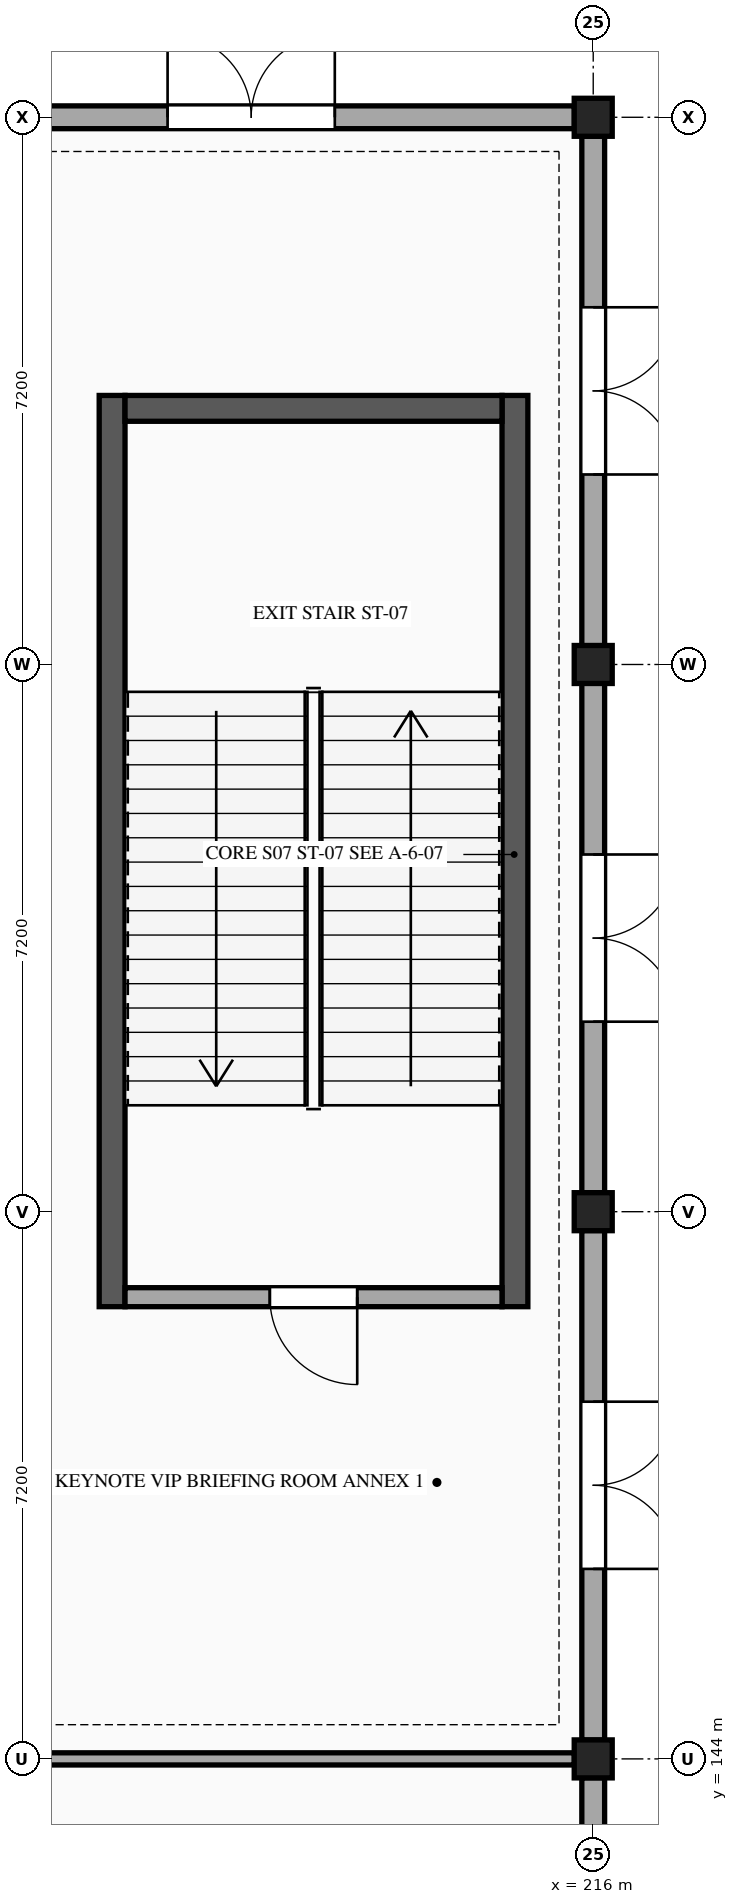
"""IFC4 building model, lengths in metres.
Left out: names, types, materials, properties, quantities, classifications, styles, units other than length and angle.
Written with IfcOpenShell. Run it as: python <this file> out.ifc"""

import sys

from ifc_helpers import new_model, si_unit, direction, frame, frame_2d, origin, origin_2d, place, context, subcontext, project, spatial, rectangle, hollow_rectangle, extrude, element, fill, save


model = new_model("IFC4")
c1 = context("Model", 3, precision=1e-05, world=origin(), true_north=direction((0.0, 1.0)))
c2 = subcontext(c1, "Body", "Model", "MODEL_VIEW")
j1 = project(units=[si_unit("LENGTHUNIT", "METRE"), si_unit("PLANEANGLEUNIT", "RADIAN")], contexts=[c1])
p1 = place(None, origin())
s1 = spatial("IfcSite", under=j1, at=p1, CompositionType="ELEMENT")
p2 = place(p1, origin())
s2 = spatial("IfcBuilding", under=s1, at=p2, CompositionType="ELEMENT")
p3 = place(p2, origin())
s3 = spatial("IfcBuildingStorey", under=s2, at=p3, CompositionType="ELEMENT", Elevation=0.0)
for number, where, z_axis, x_axis in (
    (1, (216.0, 144.0, 0.0), (0.0, 0.0, 1.0), (1.0, 0.0, 0.0)),
    (2, (216.0, 151.2, 0.0), (0.0, 0.0, 1.0), (1.0, 0.0, 0.0)),
    (3, (216.0, 158.4, 0.0), (0.0, 0.0, 1.0), (1.0, 0.0, 0.0)),
    (4, (216.0, 165.6, 0.0), (0.0, 0.0, 1.0), (1.0, 0.0, 0.0)),
):
    element("IfcColumn", number, at=place(p3, frame(where, z_axis=z_axis, x_axis=x_axis)), inside=s3, PredefinedType="COLUMN", context=c2, shape_type="SweptSolid", body=[
        extrude(hollow_rectangle(XDim=0.5, YDim=0.5, WallThickness=0.02, at=origin_2d()), origin(), (0.0, 0.0, 1.0), 5.4),
    ])
for number, where, z_axis, x_axis in (
    (5, (209.67, 149.95, 0.0), (0.0, 0.0, 1.0), (0.0, 1.0, 0.0)),
    (6, (214.97, 161.94, 0.0), (0.0, 0.0, 1.0), (0.0, -1.0, 0.0)),
):
    element("IfcWall", number, at=place(p3, frame(where, z_axis=z_axis, x_axis=x_axis)), inside=s3, PredefinedType="SHEAR", context=c2, shape_type="SweptSolid", body=[
        extrude(rectangle(XDim=11.99, YDim=0.34, at=frame_2d((5.995, 0.0))), origin(), (0.0, 0.0, 1.0), 4.98),
    ])
p4 = place(p3, frame((209.84, 161.77, 0.0), z_axis=(0.0, 0.0, 1.0), x_axis=(1.0, 0.0, 0.0)))
e7 = element("IfcWall", 7, at=p4, inside=s3, PredefinedType="SHEAR", context=c2, shape_type="SweptSolid", body=[
    extrude(rectangle(XDim=4.96, YDim=0.34, at=frame_2d((2.48, 0.0))), origin(), (0.0, 0.0, 1.0), 4.98),
])
p5 = place(p3, frame((207.248, 165.6, 0.0), z_axis=(0.0, 0.0, 1.0), x_axis=(1.0, 0.0, 0.0)))
e8 = element("IfcWall", 8, at=p5, inside=s3, PredefinedType="STANDARD", context=c2, shape_type="SweptSolid", body=[
    extrude(rectangle(XDim=8.504, YDim=0.3, at=frame_2d((4.252, 0.0))), origin(), (0.0, 0.0, 1.0), 4.297),
])
p6 = place(p5, frame((3.152, 0.0, 0.0)))
e9 = element("IfcOpeningElement", 9, at=p6, cuts=e8, PredefinedType="OPENING", context=c2, shape_type="SweptSolid", body=[
    extrude(rectangle(XDim=2.2, YDim=2.4, at=frame_2d((1.1, 1.2))), frame((0.0, 0.16, 0.0), z_axis=(0.0, -1.0, 0.0), x_axis=(1.0, 0.0, 0.0)), (0.0, 0.0, 1.0), 0.32),
])
p7 = place(p3, frame((216.0, 165.352, 0.0), z_axis=(0.0, 0.0, 1.0), x_axis=(0.0, -1.0, 0.0)))
e10 = element("IfcWall", 10, at=p7, inside=s3, PredefinedType="STANDARD", context=c2, shape_type="SweptSolid", body=[
    extrude(rectangle(XDim=6.704, YDim=0.3, at=frame_2d((3.352, 0.0))), origin(), (0.0, 0.0, 1.0), 4.607),
])
p8 = place(p7, frame((2.252, 0.0, 0.0)))
e11 = element("IfcOpeningElement", 11, at=p8, cuts=e10, PredefinedType="OPENING", context=c2, shape_type="SweptSolid", body=[
    extrude(rectangle(XDim=2.2, YDim=2.4, at=frame_2d((1.1, 1.2))), frame((0.0, 0.16, 0.0), z_axis=(0.0, -1.0, 0.0), x_axis=(1.0, 0.0, 0.0)), (0.0, 0.0, 1.0), 0.32),
])
p9 = place(p3, frame((216.0, 158.152, 0.0), z_axis=(0.0, 0.0, 1.0), x_axis=(0.0, -1.0, 0.0)))
e12 = element("IfcWall", 12, at=p9, inside=s3, PredefinedType="STANDARD", context=c2, shape_type="SweptSolid", body=[
    extrude(rectangle(XDim=6.704, YDim=0.3, at=frame_2d((3.352, 0.0))), origin(), (0.0, 0.0, 1.0), 4.68),
])
p10 = place(p9, frame((2.252, 0.0, 0.0)))
e13 = element("IfcOpeningElement", 13, at=p10, cuts=e12, PredefinedType="OPENING", context=c2, shape_type="SweptSolid", body=[
    extrude(rectangle(XDim=2.2, YDim=2.4, at=frame_2d((1.1, 1.2))), frame((0.0, 0.16, 0.0), z_axis=(0.0, -1.0, 0.0), x_axis=(1.0, 0.0, 0.0)), (0.0, 0.0, 1.0), 0.32),
])
p11 = place(p3, frame((216.0, 150.952, 0.0), z_axis=(0.0, 0.0, 1.0), x_axis=(0.0, -1.0, 0.0)))
e14 = element("IfcWall", 14, at=p11, inside=s3, PredefinedType="STANDARD", context=c2, shape_type="SweptSolid", body=[
    extrude(rectangle(XDim=6.704, YDim=0.3, at=frame_2d((3.352, 0.0))), origin(), (0.0, 0.0, 1.0), 4.124),
])
p12 = place(p11, frame((2.252, 0.0, 0.0)))
e15 = element("IfcOpeningElement", 15, at=p12, cuts=e14, PredefinedType="OPENING", context=c2, shape_type="SweptSolid", body=[
    extrude(rectangle(XDim=2.2, YDim=2.4, at=frame_2d((1.1, 1.2))), frame((0.0, 0.16, 0.0), z_axis=(0.0, -1.0, 0.0), x_axis=(1.0, 0.0, 0.0)), (0.0, 0.0, 1.0), 0.32),
])
p13 = place(p3, frame((216.0, 143.752, 0.0), z_axis=(0.0, 0.0, 1.0), x_axis=(0.0, -1.0, 0.0)))
e16 = element("IfcWall", 16, at=p13, inside=s3, PredefinedType="STANDARD", context=c2, shape_type="SweptSolid", body=[
    extrude(rectangle(XDim=6.704, YDim=0.3, at=frame_2d((3.352, 0.0))), origin(), (0.0, 0.0, 1.0), 4.124),
])
p14 = place(p13, frame((2.252, 0.0, 0.0)))
e17 = element("IfcOpeningElement", 17, at=p14, cuts=e16, PredefinedType="OPENING", context=c2, shape_type="SweptSolid", body=[
    extrude(rectangle(XDim=2.2, YDim=2.4, at=frame_2d((1.1, 1.2))), frame((0.0, 0.16, 0.0), z_axis=(0.0, -1.0, 0.0), x_axis=(1.0, 0.0, 0.0)), (0.0, 0.0, 1.0), 0.32),
])
p15 = place(p3, frame((214.8, 150.075, 0.0), z_axis=(0.0, 0.0, 1.0), x_axis=(-1.0, 0.0, 0.0)))
e18 = element("IfcWall", 18, at=p15, inside=s3, PredefinedType="STANDARD", context=c2, shape_type="SweptSolid", body=[
    extrude(rectangle(XDim=4.96, YDim=0.25, at=frame_2d((2.48, 0.0))), origin(), (0.0, 0.0, 1.0), 4.98),
])
p16 = place(p15, frame((1.905, 0.0, 0.0)))
e19 = element("IfcOpeningElement", 19, at=p16, cuts=e18, PredefinedType="OPENING", context=c2, shape_type="SweptSolid", body=[
    extrude(rectangle(XDim=1.15, YDim=2.2, at=frame_2d((0.575, 1.1))), frame((0.0, 0.135, 0.0), z_axis=(0.0, -1.0, 0.0), x_axis=(1.0, 0.0, 0.0)), (0.0, 0.0, 1.0), 0.27),
])
p17 = place(p3, frame((207.373, 144.0, 0.0), z_axis=(0.0, 0.0, 1.0), x_axis=(1.0, 0.0, 0.0)))
e20 = element("IfcWall", 20, at=p17, inside=s3, PredefinedType="PARTITIONING", context=c2, shape_type="SweptSolid", body=[
    extrude(rectangle(XDim=8.379, YDim=0.16, at=frame_2d((4.189, 0.0))), origin(), (0.0, 0.0, 1.0), 4.124),
])
p18 = place(p6, origin())
e21 = element("IfcDoor", 21, at=p18, inside=s3, OperationType="DOUBLE_DOOR_SINGLE_SWING", PredefinedType="DOOR", context=c2, shape_type="SweptSolid", body=[
    extrude(rectangle(XDim=2.2, YDim=2.4, at=frame_2d((1.1, 1.2))), frame((0.0, 0.025, 0.0), z_axis=(0.0, -1.0, 0.0), x_axis=(1.0, 0.0, 0.0)), (0.0, 0.0, 1.0), 0.05),
])
fill(e9, e21)
p19 = place(p8, origin())
e22 = element("IfcDoor", 22, at=p19, inside=s3, OperationType="DOUBLE_DOOR_SINGLE_SWING", PredefinedType="DOOR", context=c2, shape_type="SweptSolid", body=[
    extrude(rectangle(XDim=2.2, YDim=2.4, at=frame_2d((1.1, 1.2))), frame((0.0, 0.025, 0.0), z_axis=(0.0, -1.0, 0.0), x_axis=(1.0, 0.0, 0.0)), (0.0, 0.0, 1.0), 0.05),
])
fill(e11, e22)
p20 = place(p10, origin())
e23 = element("IfcDoor", 23, at=p20, inside=s3, OperationType="DOUBLE_DOOR_SINGLE_SWING", PredefinedType="DOOR", context=c2, shape_type="SweptSolid", body=[
    extrude(rectangle(XDim=2.2, YDim=2.4, at=frame_2d((1.1, 1.2))), frame((0.0, 0.025, 0.0), z_axis=(0.0, -1.0, 0.0), x_axis=(1.0, 0.0, 0.0)), (0.0, 0.0, 1.0), 0.05),
])
fill(e13, e23)
p21 = place(p12, origin())
e24 = element("IfcDoor", 24, at=p21, inside=s3, OperationType="DOUBLE_DOOR_SINGLE_SWING", PredefinedType="DOOR", context=c2, shape_type="SweptSolid", body=[
    extrude(rectangle(XDim=2.2, YDim=2.4, at=frame_2d((1.1, 1.2))), frame((0.0, 0.025, 0.0), z_axis=(0.0, -1.0, 0.0), x_axis=(1.0, 0.0, 0.0)), (0.0, 0.0, 1.0), 0.05),
])
fill(e15, e24)
p22 = place(p16, origin())
e25 = element("IfcDoor", 25, at=p22, inside=s3, OperationType="SINGLE_SWING_LEFT", PredefinedType="DOOR", context=c2, shape_type="SweptSolid", body=[
    extrude(rectangle(XDim=1.15, YDim=2.2, at=frame_2d((0.575, 1.1))), frame((0.0, 0.025, 0.0), z_axis=(0.0, -1.0, 0.0), x_axis=(1.0, 0.0, 0.0)), (0.0, 0.0, 1.0), 0.05),
])
fill(e19, e25)
save(model, sys.argv[1])
